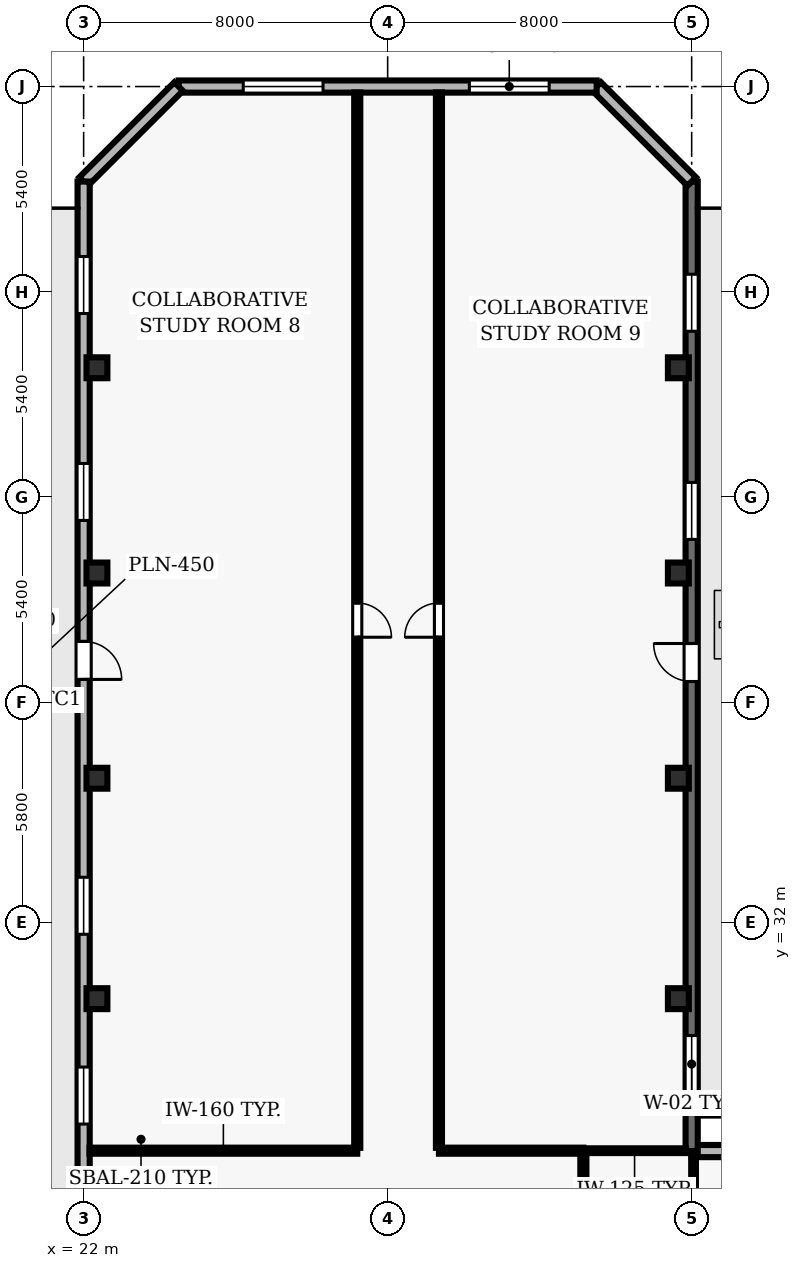
"""IFC4 building model, lengths in metres.
Left out: names, types, materials, properties, quantities, classifications, styles, units other than length and angle.
Written with IfcOpenShell. Run it as: python <this file> out.ifc"""

import sys

from ifc_helpers import new_model, si_unit, direction, frame, frame_2d, origin, origin_2d, place, context, subcontext, project, spatial, rectangle, hollow_rectangle, extrude, element, fill, save


model = new_model("IFC4")
c1 = context("Model", 3, precision=1e-05, world=origin(), true_north=direction((0.0, 1.0)))
c2 = subcontext(c1, "Body", "Model", "MODEL_VIEW")
j1 = project(units=[si_unit("LENGTHUNIT", "METRE"), si_unit("PLANEANGLEUNIT", "RADIAN")], contexts=[c1])
p1 = place(None, origin())
s1 = spatial("IfcSite", under=j1, at=p1, CompositionType="ELEMENT")
p2 = place(p1, origin())
s2 = spatial("IfcBuilding", under=s1, at=p2, CompositionType="ELEMENT")
p3 = place(p2, frame((0.0, 0.0, 73.9)))
s3 = spatial("IfcBuildingStorey", under=s2, at=p3, CompositionType="ELEMENT", Elevation=73.9)
for number, where, z_axis, x_axis in (
    (1, (22.35, 30.0, 0.0), (0.0, 0.0, 1.0), (1.0, 0.0, 0.0)),
    (2, (37.65, 30.0, 0.0), (0.0, 0.0, 1.0), (1.0, 0.0, 0.0)),
    (3, (22.35, 35.8, 0.0), (0.0, 0.0, 1.0), (1.0, 0.0, 0.0)),
    (4, (37.65, 35.8, 0.0), (0.0, 0.0, 1.0), (1.0, 0.0, 0.0)),
    (5, (22.35, 41.2, 0.0), (0.0, 0.0, 1.0), (1.0, 0.0, 0.0)),
    (6, (37.65, 41.2, 0.0), (0.0, 0.0, 1.0), (1.0, 0.0, 0.0)),
    (7, (22.35, 46.6, 0.0), (0.0, 0.0, 1.0), (1.0, 0.0, 0.0)),
    (8, (37.65, 46.6, 0.0), (0.0, 0.0, 1.0), (1.0, 0.0, 0.0)),
):
    element("IfcColumn", number, at=place(p3, frame(where, z_axis=z_axis, x_axis=x_axis)), inside=s3, PredefinedType="COLUMN", context=c2, shape_type="SweptSolid", body=[
        extrude(hollow_rectangle(XDim=0.55, YDim=0.55, WallThickness=0.025, at=origin_2d()), origin(), (0.0, 0.0, 1.0), 3.9),
    ])
p4 = place(p3, frame((48.5, 25.99, 0.0), z_axis=(0.0, 0.0, 1.0), x_axis=(-1.0, 0.0, 0.0)))
e9 = element("IfcWall", 9, at=p4, inside=s3, PredefinedType="SOLIDWALL", context=c2, shape_type="SweptSolid", body=[
    extrude(rectangle(XDim=10.5, YDim=0.32, at=frame_2d((5.25, 0.0))), origin(), (0.0, 0.0, 1.0), 3.69),
])
p5 = place(p4, frame((4.65, 0.0, 0.9)))
e10 = element("IfcOpeningElement", 10, at=p5, cuts=e9, PredefinedType="OPENING", context=c2, shape_type="SweptSolid", body=[
    extrude(rectangle(XDim=1.2, YDim=1.6, at=frame_2d((0.6, 0.8))), frame((0.0, 0.17, 0.0), z_axis=(0.0, -1.0, 0.0), x_axis=(1.0, 0.0, 0.0)), (0.0, 0.0, 1.0), 0.34),
])
p6 = place(p3, frame((38.0, 25.99, 0.0), z_axis=(0.0, 0.0, 1.0), x_axis=(0.0, 1.0, 0.0)))
e11 = element("IfcWall", 11, at=p6, inside=s3, PredefinedType="SOLIDWALL", context=c2, shape_type="SweptSolid", body=[
    extrude(rectangle(XDim=25.51, YDim=0.32, at=frame_2d((12.755, 0.0))), origin(), (0.0, 0.0, 1.0), 3.69),
])
p7 = place(p6, frame((12.355, 0.0, 0.0)))
e12 = element("IfcOpeningElement", 12, at=p7, cuts=e11, PredefinedType="OPENING", context=c2, shape_type="SweptSolid", body=[
    extrude(rectangle(XDim=1.0, YDim=2.2, at=frame_2d((0.5, 1.1))), frame((0.0, 0.17, 0.0), z_axis=(0.0, -1.0, 0.0), x_axis=(1.0, 0.0, 0.0)), (0.0, 0.0, 1.0), 0.34),
])
p8 = place(p6, frame((1.539, 0.0, 0.9)))
e13 = element("IfcOpeningElement", 13, at=p8, cuts=e11, PredefinedType="OPENING", context=c2, shape_type="SweptSolid", body=[
    extrude(rectangle(XDim=1.5, YDim=1.6, at=frame_2d((0.75, 0.8))), frame((0.0, 0.17, 0.0), z_axis=(0.0, -1.0, 0.0), x_axis=(1.0, 0.0, 0.0)), (0.0, 0.0, 1.0), 0.34),
])
p9 = place(p6, frame((16.094, 0.0, 0.9)))
e14 = element("IfcOpeningElement", 14, at=p9, cuts=e11, PredefinedType="OPENING", context=c2, shape_type="SweptSolid", body=[
    extrude(rectangle(XDim=1.5, YDim=1.6, at=frame_2d((0.75, 0.8))), frame((0.0, 0.17, 0.0), z_axis=(0.0, -1.0, 0.0), x_axis=(1.0, 0.0, 0.0)), (0.0, 0.0, 1.0), 0.34),
])
p10 = place(p6, frame((21.571, 0.0, 0.9)))
e15 = element("IfcOpeningElement", 15, at=p10, cuts=e11, PredefinedType="OPENING", context=c2, shape_type="SweptSolid", body=[
    extrude(rectangle(XDim=1.5, YDim=1.6, at=frame_2d((0.75, 0.8))), frame((0.0, 0.17, 0.0), z_axis=(0.0, -1.0, 0.0), x_axis=(1.0, 0.0, 0.0)), (0.0, 0.0, 1.0), 0.34),
])
p11 = place(p3, frame((38.0, 51.5, 0.0), z_axis=(0.0, 0.0, 1.0), x_axis=(-0.707106781187, 0.707106781187, 0.0)))
e16 = element("IfcWall", 16, at=p11, inside=s3, PredefinedType="SOLIDWALL", context=c2, shape_type="SweptSolid", body=[
    extrude(rectangle(XDim=3.536, YDim=0.32, at=frame_2d((1.768, 0.0))), origin(), (0.0, 0.0, 1.0), 3.69),
])
p12 = place(p3, frame((35.5, 54.0, 0.0), z_axis=(0.0, 0.0, 1.0), x_axis=(-1.0, 0.0, 0.0)))
e17 = element("IfcWall", 17, at=p12, inside=s3, PredefinedType="SOLIDWALL", context=c2, shape_type="SweptSolid", body=[
    extrude(rectangle(XDim=11.0, YDim=0.32, at=frame_2d((5.5, 0.0))), origin(), (0.0, 0.0, 1.0), 3.69),
])
p13 = place(p12, frame((1.25, 0.0, 0.9)))
e18 = element("IfcOpeningElement", 18, at=p13, cuts=e17, PredefinedType="OPENING", context=c2, shape_type="SweptSolid", body=[
    extrude(rectangle(XDim=2.1, YDim=1.6, at=frame_2d((1.05, 0.8))), frame((0.0, 0.17, 0.0), z_axis=(0.0, -1.0, 0.0), x_axis=(1.0, 0.0, 0.0)), (0.0, 0.0, 1.0), 0.34),
])
p14 = place(p12, frame((7.2, 0.0, 0.9)))
e19 = element("IfcOpeningElement", 19, at=p14, cuts=e17, PredefinedType="OPENING", context=c2, shape_type="SweptSolid", body=[
    extrude(rectangle(XDim=2.1, YDim=1.6, at=frame_2d((1.05, 0.8))), frame((0.0, 0.17, 0.0), z_axis=(0.0, -1.0, 0.0), x_axis=(1.0, 0.0, 0.0)), (0.0, 0.0, 1.0), 0.34),
])
p15 = place(p3, frame((24.5, 54.0, 0.0), z_axis=(0.0, 0.0, 1.0), x_axis=(-0.707106781187, -0.707106781187, 0.0)))
e20 = element("IfcWall", 20, at=p15, inside=s3, PredefinedType="SOLIDWALL", context=c2, shape_type="SweptSolid", body=[
    extrude(rectangle(XDim=3.536, YDim=0.32, at=frame_2d((1.768, 0.0))), origin(), (0.0, 0.0, 1.0), 3.69),
])
p16 = place(p3, frame((22.0, 51.5, 0.0), z_axis=(0.0, 0.0, 1.0), x_axis=(0.0, -1.0, 0.0)))
e21 = element("IfcWall", 21, at=p16, inside=s3, PredefinedType="SOLIDWALL", context=c2, shape_type="SweptSolid", body=[
    extrude(rectangle(XDim=49.0, YDim=0.32, at=frame_2d((24.5, 0.0))), origin(), (0.0, 0.0, 1.0), 3.69),
])
p17 = place(p16, frame((12.1, 0.0, 0.0)))
e22 = element("IfcOpeningElement", 22, at=p17, cuts=e21, PredefinedType="OPENING", context=c2, shape_type="SweptSolid", body=[
    extrude(rectangle(XDim=1.0, YDim=2.2, at=frame_2d((0.5, 1.1))), frame((0.0, 0.17, 0.0), z_axis=(0.0, -1.0, 0.0), x_axis=(1.0, 0.0, 0.0)), (0.0, 0.0, 1.0), 0.34),
])
p18 = place(p16, frame((1.972, 0.0, 0.9)))
e23 = element("IfcOpeningElement", 23, at=p18, cuts=e21, PredefinedType="OPENING", context=c2, shape_type="SweptSolid", body=[
    extrude(rectangle(XDim=1.5, YDim=1.8, at=frame_2d((0.75, 0.9))), frame((0.0, 0.17, 0.0), z_axis=(0.0, -1.0, 0.0), x_axis=(1.0, 0.0, 0.0)), (0.0, 0.0, 1.0), 0.34),
])
p19 = place(p16, frame((7.417, 0.0, 0.9)))
e24 = element("IfcOpeningElement", 24, at=p19, cuts=e21, PredefinedType="OPENING", context=c2, shape_type="SweptSolid", body=[
    extrude(rectangle(XDim=1.5, YDim=1.8, at=frame_2d((0.75, 0.9))), frame((0.0, 0.17, 0.0), z_axis=(0.0, -1.0, 0.0), x_axis=(1.0, 0.0, 0.0)), (0.0, 0.0, 1.0), 0.34),
])
p20 = place(p16, frame((18.306, 0.0, 0.9)))
e25 = element("IfcOpeningElement", 25, at=p20, cuts=e21, PredefinedType="OPENING", context=c2, shape_type="SweptSolid", body=[
    extrude(rectangle(XDim=1.5, YDim=1.8, at=frame_2d((0.75, 0.9))), frame((0.0, 0.17, 0.0), z_axis=(0.0, -1.0, 0.0), x_axis=(1.0, 0.0, 0.0)), (0.0, 0.0, 1.0), 0.34),
])
p21 = place(p16, frame((23.3, 0.0, 0.9)))
e26 = element("IfcOpeningElement", 26, at=p21, cuts=e21, PredefinedType="OPENING", context=c2, shape_type="SweptSolid", body=[
    extrude(rectangle(XDim=1.5, YDim=1.8, at=frame_2d((0.75, 0.9))), frame((0.0, 0.17, 0.0), z_axis=(0.0, -1.0, 0.0), x_axis=(1.0, 0.0, 0.0)), (0.0, 0.0, 1.0), 0.34),
])
p22 = place(p16, frame((29.194, 0.0, 0.9)))
e27 = element("IfcOpeningElement", 27, at=p22, cuts=e21, PredefinedType="OPENING", context=c2, shape_type="SweptSolid", body=[
    extrude(rectangle(XDim=1.5, YDim=1.8, at=frame_2d((0.75, 0.9))), frame((0.0, 0.17, 0.0), z_axis=(0.0, -1.0, 0.0), x_axis=(1.0, 0.0, 0.0)), (0.0, 0.0, 1.0), 0.34),
])
p23 = place(p16, frame((34.189, 0.0, 0.9)))
e28 = element("IfcOpeningElement", 28, at=p23, cuts=e21, PredefinedType="OPENING", context=c2, shape_type="SweptSolid", body=[
    extrude(rectangle(XDim=1.5, YDim=1.8, at=frame_2d((0.75, 0.9))), frame((0.0, 0.17, 0.0), z_axis=(0.0, -1.0, 0.0), x_axis=(1.0, 0.0, 0.0)), (0.0, 0.0, 1.0), 0.34),
])
p24 = place(p16, frame((40.083, 0.0, 0.9)))
e29 = element("IfcOpeningElement", 29, at=p24, cuts=e21, PredefinedType="OPENING", context=c2, shape_type="SweptSolid", body=[
    extrude(rectangle(XDim=1.5, YDim=1.8, at=frame_2d((0.75, 0.9))), frame((0.0, 0.17, 0.0), z_axis=(0.0, -1.0, 0.0), x_axis=(1.0, 0.0, 0.0)), (0.0, 0.0, 1.0), 0.34),
])
p25 = place(p3, frame((29.2, 26.0, 0.0), z_axis=(0.0, 0.0, 1.0), x_axis=(-1.0, 0.0, 0.0)))
e30 = element("IfcWall", 30, at=p25, inside=s3, PredefinedType="PARTITIONING", context=c2, shape_type="SweptSolid", body=[
    extrude(rectangle(XDim=7.045, YDim=0.16, at=frame_2d((3.522, 0.0))), origin(), (0.0, 0.0, 1.0), 3.69),
])
p26 = place(p3, frame((35.15, 26.0, 0.0), z_axis=(0.0, 0.0, 1.0), x_axis=(-1.0, 0.0, 0.0)))
e31 = element("IfcWall", 31, at=p26, inside=s3, PredefinedType="PARTITIONING", context=c2, shape_type="SweptSolid", body=[
    extrude(rectangle(XDim=3.8, YDim=0.16, at=frame_2d((1.9, 0.0))), origin(), (0.0, 0.0, 1.0), 3.69),
])
p27 = place(p3, frame((35.15, 26.0, 0.0), z_axis=(0.0, 0.0, 1.0), x_axis=(1.0, 0.0, 0.0)))
e32 = element("IfcWall", 32, at=p27, inside=s3, PredefinedType="PARTITIONING", context=c2, shape_type="SweptSolid", body=[
    extrude(rectangle(XDim=2.695, YDim=0.125, at=frame_2d((1.348, 0.0))), origin(), (0.0, 0.0, 1.0), 3.69),
])
p28 = place(p3, frame((29.2, 53.845, 0.0), z_axis=(0.0, 0.0, 1.0), x_axis=(0.0, -1.0, 0.0)))
e33 = element("IfcWall", 33, at=p28, inside=s3, PredefinedType="PARTITIONING", context=c2, shape_type="SweptSolid", body=[
    extrude(rectangle(XDim=27.77, YDim=0.16, at=frame_2d((13.885, 0.0))), origin(), (0.0, 0.0, 1.0), 3.69),
])
p29 = place(p28, frame((13.435, 0.0, 0.0)))
e34 = element("IfcOpeningElement", 34, at=p29, cuts=e33, PredefinedType="OPENING", context=c2, shape_type="SweptSolid", body=[
    extrude(rectangle(XDim=0.9, YDim=2.1, at=frame_2d((0.45, 1.05))), frame((0.0, 0.09, 0.0), z_axis=(0.0, -1.0, 0.0), x_axis=(1.0, 0.0, 0.0)), (0.0, 0.0, 1.0), 0.18),
])
p30 = place(p3, frame((31.35, 26.075, 0.0), z_axis=(0.0, 0.0, 1.0), x_axis=(0.0, 1.0, 0.0)))
e35 = element("IfcWall", 35, at=p30, inside=s3, PredefinedType="PARTITIONING", context=c2, shape_type="SweptSolid", body=[
    extrude(rectangle(XDim=27.77, YDim=0.16, at=frame_2d((13.885, 0.0))), origin(), (0.0, 0.0, 1.0), 3.69),
])
p31 = place(p30, frame((13.435, 0.0, 0.0)))
e36 = element("IfcOpeningElement", 36, at=p31, cuts=e35, PredefinedType="OPENING", context=c2, shape_type="SweptSolid", body=[
    extrude(rectangle(XDim=0.9, YDim=2.1, at=frame_2d((0.45, 1.05))), frame((0.0, 0.09, 0.0), z_axis=(0.0, -1.0, 0.0), x_axis=(1.0, 0.0, 0.0)), (0.0, 0.0, 1.0), 0.18),
])
p32 = place(p3, frame((35.15, 24.07, 0.0), z_axis=(0.0, 0.0, 1.0), x_axis=(0.0, 1.0, 0.0)))
e37 = element("IfcWall", 37, at=p32, inside=s3, PredefinedType="PARTITIONING", context=c2, shape_type="SweptSolid", body=[
    extrude(rectangle(XDim=1.855, YDim=0.16, at=frame_2d((0.927, 0.0))), origin(), (0.0, 0.0, 1.0), 3.69),
])
p33 = place(p3, frame((38.05, 25.835, 0.0), z_axis=(0.0, 0.0, 1.0), x_axis=(0.0, -1.0, 0.0)))
e38 = element("IfcWall", 38, at=p33, inside=s3, PredefinedType="PARTITIONING", context=c2, shape_type="SweptSolid", body=[
    extrude(rectangle(XDim=1.785, YDim=0.125, at=frame_2d((0.893, 0.0))), origin(), (0.0, 0.0, 1.0), 3.055),
])
p34 = place(p7, origin())
e39 = element("IfcDoor", 39, at=p34, inside=s3, OperationType="SINGLE_SWING_RIGHT", PredefinedType="DOOR", context=c2, shape_type="SweptSolid", body=[
    extrude(rectangle(XDim=1.0, YDim=2.2, at=frame_2d((0.5, 1.1))), frame((0.0, 0.025, 0.0), z_axis=(0.0, -1.0, 0.0), x_axis=(1.0, 0.0, 0.0)), (0.0, 0.0, 1.0), 0.05),
])
fill(e12, e39)
p35 = place(p8, origin())
e40 = element("IfcWindow", 40, at=p35, inside=s3, PartitioningType="SINGLE_PANEL", PredefinedType="WINDOW", context=c2, shape_type="SweptSolid", body=[
    extrude(rectangle(XDim=1.5, YDim=1.6, at=frame_2d((0.75, 0.8))), frame((0.0, 0.03, 0.0), z_axis=(0.0, -1.0, 0.0), x_axis=(1.0, 0.0, 0.0)), (0.0, 0.0, 1.0), 0.06),
])
fill(e13, e40)
p36 = place(p9, origin())
e41 = element("IfcWindow", 41, at=p36, inside=s3, PartitioningType="SINGLE_PANEL", PredefinedType="WINDOW", context=c2, shape_type="SweptSolid", body=[
    extrude(rectangle(XDim=1.5, YDim=1.6, at=frame_2d((0.75, 0.8))), frame((0.0, 0.03, 0.0), z_axis=(0.0, -1.0, 0.0), x_axis=(1.0, 0.0, 0.0)), (0.0, 0.0, 1.0), 0.06),
])
fill(e14, e41)
p37 = place(p10, origin())
e42 = element("IfcWindow", 42, at=p37, inside=s3, PartitioningType="SINGLE_PANEL", PredefinedType="WINDOW", context=c2, shape_type="SweptSolid", body=[
    extrude(rectangle(XDim=1.5, YDim=1.6, at=frame_2d((0.75, 0.8))), frame((0.0, 0.03, 0.0), z_axis=(0.0, -1.0, 0.0), x_axis=(1.0, 0.0, 0.0)), (0.0, 0.0, 1.0), 0.06),
])
fill(e15, e42)
p38 = place(p13, origin())
e43 = element("IfcWindow", 43, at=p38, inside=s3, PartitioningType="SINGLE_PANEL", PredefinedType="WINDOW", context=c2, shape_type="SweptSolid", body=[
    extrude(rectangle(XDim=2.1, YDim=1.6, at=frame_2d((1.05, 0.8))), frame((0.0, 0.03, 0.0), z_axis=(0.0, -1.0, 0.0), x_axis=(1.0, 0.0, 0.0)), (0.0, 0.0, 1.0), 0.06),
])
fill(e18, e43)
p39 = place(p14, origin())
e44 = element("IfcWindow", 44, at=p39, inside=s3, PartitioningType="SINGLE_PANEL", PredefinedType="WINDOW", context=c2, shape_type="SweptSolid", body=[
    extrude(rectangle(XDim=2.1, YDim=1.6, at=frame_2d((1.05, 0.8))), frame((0.0, 0.03, 0.0), z_axis=(0.0, -1.0, 0.0), x_axis=(1.0, 0.0, 0.0)), (0.0, 0.0, 1.0), 0.06),
])
fill(e19, e44)
p40 = place(p17, origin())
e45 = element("IfcDoor", 45, at=p40, inside=s3, OperationType="SINGLE_SWING_RIGHT", PredefinedType="DOOR", context=c2, shape_type="SweptSolid", body=[
    extrude(rectangle(XDim=1.0, YDim=2.2, at=frame_2d((0.5, 1.1))), frame((0.0, 0.025, 0.0), z_axis=(0.0, -1.0, 0.0), x_axis=(1.0, 0.0, 0.0)), (0.0, 0.0, 1.0), 0.05),
])
fill(e22, e45)
p41 = place(p18, origin())
e46 = element("IfcWindow", 46, at=p41, inside=s3, PartitioningType="SINGLE_PANEL", PredefinedType="WINDOW", context=c2, shape_type="SweptSolid", body=[
    extrude(rectangle(XDim=1.5, YDim=1.8, at=frame_2d((0.75, 0.9))), frame((0.0, 0.03, 0.0), z_axis=(0.0, -1.0, 0.0), x_axis=(1.0, 0.0, 0.0)), (0.0, 0.0, 1.0), 0.06),
])
fill(e23, e46)
p42 = place(p19, origin())
e47 = element("IfcWindow", 47, at=p42, inside=s3, PartitioningType="SINGLE_PANEL", PredefinedType="WINDOW", context=c2, shape_type="SweptSolid", body=[
    extrude(rectangle(XDim=1.5, YDim=1.8, at=frame_2d((0.75, 0.9))), frame((0.0, 0.03, 0.0), z_axis=(0.0, -1.0, 0.0), x_axis=(1.0, 0.0, 0.0)), (0.0, 0.0, 1.0), 0.06),
])
fill(e24, e47)
p43 = place(p20, origin())
e48 = element("IfcWindow", 48, at=p43, inside=s3, PartitioningType="SINGLE_PANEL", PredefinedType="WINDOW", context=c2, shape_type="SweptSolid", body=[
    extrude(rectangle(XDim=1.5, YDim=1.8, at=frame_2d((0.75, 0.9))), frame((0.0, 0.03, 0.0), z_axis=(0.0, -1.0, 0.0), x_axis=(1.0, 0.0, 0.0)), (0.0, 0.0, 1.0), 0.06),
])
fill(e25, e48)
p44 = place(p21, origin())
e49 = element("IfcWindow", 49, at=p44, inside=s3, PartitioningType="SINGLE_PANEL", PredefinedType="WINDOW", context=c2, shape_type="SweptSolid", body=[
    extrude(rectangle(XDim=1.5, YDim=1.8, at=frame_2d((0.75, 0.9))), frame((0.0, 0.03, 0.0), z_axis=(0.0, -1.0, 0.0), x_axis=(1.0, 0.0, 0.0)), (0.0, 0.0, 1.0), 0.06),
])
fill(e26, e49)
p45 = place(p29, origin())
e50 = element("IfcDoor", 50, at=p45, inside=s3, OperationType="SINGLE_SWING_RIGHT", PredefinedType="DOOR", context=c2, shape_type="SweptSolid", body=[
    extrude(rectangle(XDim=0.9, YDim=2.1, at=frame_2d((0.45, 1.05))), frame((0.0, 0.025, 0.0), z_axis=(0.0, -1.0, 0.0), x_axis=(1.0, 0.0, 0.0)), (0.0, 0.0, 1.0), 0.05),
])
fill(e34, e50)
p46 = place(p31, origin())
e51 = element("IfcDoor", 51, at=p46, inside=s3, OperationType="SINGLE_SWING_LEFT", PredefinedType="DOOR", context=c2, shape_type="SweptSolid", body=[
    extrude(rectangle(XDim=0.9, YDim=2.1, at=frame_2d((0.45, 1.05))), frame((0.0, 0.025, 0.0), z_axis=(0.0, -1.0, 0.0), x_axis=(1.0, 0.0, 0.0)), (0.0, 0.0, 1.0), 0.05),
])
fill(e36, e51)
save(model, sys.argv[1])
